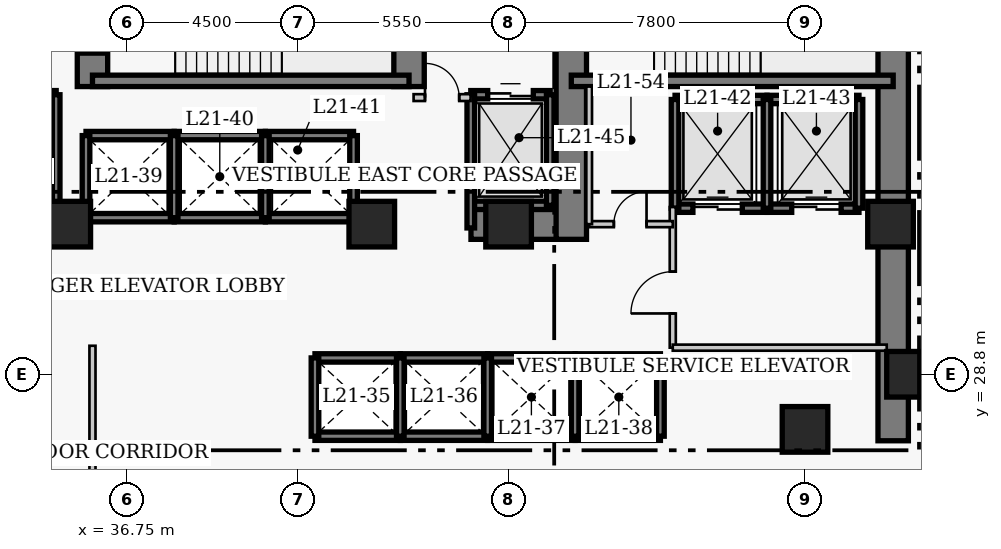
"""IFC4 building model, lengths in metres.
Left out: names, types, materials, properties, quantities, classifications, styles, units other than length and angle.
Written with IfcOpenShell. Run it as: python <this file> out.ifc"""

import sys

from ifc_helpers import new_model, si_unit, direction, frame, frame_2d, origin, origin_2d, place, context, subcontext, project, spatial, rectangle, extrude, element, fill, save


model = new_model("IFC4")
c1 = context("Model", 3, precision=1e-05, world=origin(), true_north=direction((0.0, 1.0)))
c2 = subcontext(c1, "Body", "Model", "MODEL_VIEW")
j1 = project(units=[si_unit("LENGTHUNIT", "METRE"), si_unit("PLANEANGLEUNIT", "RADIAN")], contexts=[c1])
p1 = place(None, origin())
s1 = spatial("IfcSite", under=j1, at=p1, CompositionType="ELEMENT")
p2 = place(p1, origin())
s2 = spatial("IfcBuilding", under=s1, at=p2, CompositionType="ELEMENT")
p3 = place(p2, frame((0.0, 0.0, 88.0)))
s3 = spatial("IfcBuildingStorey", under=s2, at=p3, CompositionType="ELEMENT", Elevation=88.0)
p4 = place(p3, frame((56.92, 27.05, 0.0), z_axis=(0.0, 0.0, 1.0), x_axis=(0.0, 1.0, 0.0)))
e1 = element("IfcWall", 1, at=p4, inside=s3, PredefinedType="SHEAR", context=c2, shape_type="SweptSolid", body=[
    extrude(rectangle(XDim=13.67, YDim=0.8, at=frame_2d((6.835, 0.0))), origin(), (0.0, 0.0, 1.0), 3.8),
])
p5 = place(p3, frame((45.81, 32.75, 0.0), z_axis=(0.0, 0.0, 1.0), x_axis=(1.0, 0.0, 0.0)))
e2 = element("IfcWall", 2, at=p5, inside=s3, PredefinedType="SHEAR", context=c2, shape_type="SweptSolid", body=[
    extrude(rectangle(XDim=2.64, YDim=0.8, at=frame_2d((1.32, 0.0))), origin(), (0.0, 0.0, 1.0), 3.8),
])
p6 = place(p3, frame((35.85, 36.37, 0.0), z_axis=(0.0, 0.0, 1.0), x_axis=(0.0, 1.0, 0.0)))
e3 = element("IfcWall", 3, at=p6, inside=s3, PredefinedType="SHEAR", context=c2, shape_type="SweptSolid", body=[
    extrude(rectangle(XDim=3.95, YDim=0.8, at=frame_2d((1.975, 0.0))), origin(), (0.0, 0.0, 1.0), 3.8),
])
p7 = place(p6, frame((0.88, 0.0, 0.0)))
e4 = element("IfcOpeningElement", 4, at=p7, cuts=e3, PredefinedType="OPENING", context=c2, shape_type="SweptSolid", body=[
    extrude(rectangle(XDim=1.1, YDim=2.15, at=frame_2d((0.55, 1.075))), frame((0.0, 0.41, 0.0), z_axis=(0.0, -1.0, 0.0), x_axis=(1.0, 0.0, 0.0)), (0.0, 0.0, 1.0), 0.82),
])
p8 = place(p3, frame((44.18, 36.37, 0.0), z_axis=(0.0, 0.0, 1.0), x_axis=(0.0, 1.0, 0.0)))
e5 = element("IfcWall", 5, at=p8, inside=s3, PredefinedType="SHEAR", context=c2, shape_type="SweptSolid", body=[
    extrude(rectangle(XDim=3.95, YDim=0.8, at=frame_2d((1.975, 0.0))), origin(), (0.0, 0.0, 1.0), 3.8),
])
p9 = place(p3, frame((48.45, 32.35, 0.0), z_axis=(0.0, 0.0, 1.0), x_axis=(0.0, 1.0, 0.0)))
e6 = element("IfcWall", 6, at=p9, inside=s3, PredefinedType="SHEAR", context=c2, shape_type="SweptSolid", body=[
    extrude(rectangle(XDim=7.97, YDim=0.8, at=frame_2d((3.985, 0.0))), origin(), (0.0, 0.0, 1.0), 3.8),
])
p10 = place(p9, frame((5.85, 0.0, 0.0)))
e7 = element("IfcOpeningElement", 7, at=p10, cuts=e6, PredefinedType="OPENING", context=c2, shape_type="SweptSolid", body=[
    extrude(rectangle(XDim=1.1, YDim=2.15, at=frame_2d((0.55, 1.075))), frame((0.0, 0.41, 0.0), z_axis=(0.0, -1.0, 0.0), x_axis=(1.0, 0.0, 0.0)), (0.0, 0.0, 1.0), 0.82),
])
p11 = place(p3, frame((35.85, 36.52, 0.0), z_axis=(0.0, 0.0, 1.0), x_axis=(1.0, 0.0, 0.0)))
e8 = element("IfcWall", 8, at=p11, inside=s3, PredefinedType="SHEAR", context=c2, shape_type="SweptSolid", body=[
    extrude(rectangle(XDim=8.33, YDim=0.3, at=frame_2d((4.165, 0.0))), origin(), (0.0, 0.0, 1.0), 3.8),
])
p12 = place(p3, frame((48.45, 36.52, 0.0), z_axis=(0.0, 0.0, 1.0), x_axis=(1.0, 0.0, 0.0)))
e9 = element("IfcWall", 9, at=p12, inside=s3, PredefinedType="SHEAR", context=c2, shape_type="SweptSolid", body=[
    extrude(rectangle(XDim=8.47, YDim=0.3, at=frame_2d((4.235, 0.0))), origin(), (0.0, 0.0, 1.0), 3.8),
])
for number, where, z_axis, x_axis in (
    (10, (57.35, 28.8, 0.0), (0.0, 0.0, 1.0), (1.0, 0.0, 0.0)),
    (11, (35.2, 32.75, 0.0), (0.0, 0.0, 1.0), (1.0, 0.0, 0.0)),
    (12, (43.2, 32.75, 0.0), (0.0, 0.0, 1.0), (1.0, 0.0, 0.0)),
    (13, (46.8, 32.75, 0.0), (0.0, 0.0, 1.0), (1.0, 0.0, 0.0)),
    (14, (54.6, 27.35, 0.0), (0.0, 0.0, 1.0), (1.0, 0.0, 0.0)),
    (15, (56.85, 32.75, 0.0), (0.0, 0.0, 1.0), (1.0, 0.0, 0.0)),
):
    element("IfcColumn", number, at=place(p3, frame(where, z_axis=z_axis, x_axis=x_axis)), inside=s3, PredefinedType="COLUMN", context=c2, shape_type="SweptSolid", body=[
        extrude(rectangle(XDim=1.2, YDim=1.2, at=origin_2d()), origin(), (0.0, 0.0, 1.0), 3.8),
    ])
for number, where, z_axis, x_axis in (
    (16, (41.705, 29.23, 0.0), (0.0, 0.0, 1.0), (1.0, 0.0, 0.0)),
    (17, (41.705, 27.17, 0.0), (0.0, 0.0, 1.0), (1.0, 0.0, 0.0)),
):
    element("IfcWall", number, at=place(p3, frame(where, z_axis=z_axis, x_axis=x_axis)), inside=s3, PredefinedType="SHEAR", context=c2, shape_type="SweptSolid", body=[
        extrude(rectangle(XDim=2.245, YDim=0.22, at=frame_2d((1.123, 0.0))), origin(), (0.0, 0.0, 1.0), 3.8),
    ])
p13 = place(p3, frame((41.705, 27.17, 0.0), z_axis=(0.0, 0.0, 1.0), x_axis=(0.0, 1.0, 0.0)))
e18 = element("IfcWall", 18, at=p13, inside=s3, PredefinedType="SHEAR", context=c2, shape_type="SweptSolid", body=[
    extrude(rectangle(XDim=2.06, YDim=0.2, at=frame_2d((1.03, 0.0))), origin(), (0.0, 0.0, 1.0), 3.8),
])
for number, where, z_axis, x_axis in (
    (19, (43.95, 29.23, 0.0), (0.0, 0.0, 1.0), (1.0, 0.0, 0.0)),
    (20, (43.95, 27.17, 0.0), (0.0, 0.0, 1.0), (1.0, 0.0, 0.0)),
):
    element("IfcWall", number, at=place(p3, frame(where, z_axis=z_axis, x_axis=x_axis)), inside=s3, PredefinedType="SHEAR", context=c2, shape_type="SweptSolid", body=[
        extrude(rectangle(XDim=2.3, YDim=0.22, at=frame_2d((1.15, 0.0))), origin(), (0.0, 0.0, 1.0), 3.8),
    ])
p14 = place(p3, frame((43.95, 27.17, 0.0), z_axis=(0.0, 0.0, 1.0), x_axis=(0.0, 1.0, 0.0)))
e21 = element("IfcWall", 21, at=p14, inside=s3, PredefinedType="SHEAR", context=c2, shape_type="SweptSolid", body=[
    extrude(rectangle(XDim=2.06, YDim=0.2, at=frame_2d((1.03, 0.0))), origin(), (0.0, 0.0, 1.0), 3.8),
])
for number, where, z_axis, x_axis in (
    (22, (46.25, 29.23, 0.0), (0.0, 0.0, 1.0), (1.0, 0.0, 0.0)),
    (23, (46.25, 27.17, 0.0), (0.0, 0.0, 1.0), (1.0, 0.0, 0.0)),
):
    element("IfcWall", number, at=place(p3, frame(where, z_axis=z_axis, x_axis=x_axis)), inside=s3, PredefinedType="SHEAR", context=c2, shape_type="SweptSolid", body=[
        extrude(rectangle(XDim=2.3, YDim=0.22, at=frame_2d((1.15, 0.0))), origin(), (0.0, 0.0, 1.0), 3.8),
    ])
p15 = place(p3, frame((46.25, 27.17, 0.0), z_axis=(0.0, 0.0, 1.0), x_axis=(0.0, 1.0, 0.0)))
e24 = element("IfcWall", 24, at=p15, inside=s3, PredefinedType="SHEAR", context=c2, shape_type="SweptSolid", body=[
    extrude(rectangle(XDim=2.06, YDim=0.2, at=frame_2d((1.03, 0.0))), origin(), (0.0, 0.0, 1.0), 3.8),
])
for number, where, z_axis, x_axis in (
    (25, (48.55, 29.23, 0.0), (0.0, 0.0, 1.0), (1.0, 0.0, 0.0)),
    (26, (48.55, 27.17, 0.0), (0.0, 0.0, 1.0), (1.0, 0.0, 0.0)),
):
    element("IfcWall", number, at=place(p3, frame(where, z_axis=z_axis, x_axis=x_axis)), inside=s3, PredefinedType="SHEAR", context=c2, shape_type="SweptSolid", body=[
        extrude(rectangle(XDim=2.245, YDim=0.22, at=frame_2d((1.123, 0.0))), origin(), (0.0, 0.0, 1.0), 3.8),
    ])
for number, where, z_axis, x_axis in (
    (27, (48.55, 27.17, 0.0), (0.0, 0.0, 1.0), (0.0, 1.0, 0.0)),
    (28, (50.795, 27.17, 0.0), (0.0, 0.0, 1.0), (0.0, 1.0, 0.0)),
):
    element("IfcWall", number, at=place(p3, frame(where, z_axis=z_axis, x_axis=x_axis)), inside=s3, PredefinedType="SHEAR", context=c2, shape_type="SweptSolid", body=[
        extrude(rectangle(XDim=2.06, YDim=0.2, at=frame_2d((1.03, 0.0))), origin(), (0.0, 0.0, 1.0), 3.8),
    ])
for number, where, z_axis, x_axis in (
    (29, (35.68, 35.08, 0.0), (0.0, 0.0, 1.0), (1.0, 0.0, 0.0)),
    (30, (35.68, 32.92, 0.0), (0.0, 0.0, 1.0), (1.0, 0.0, 0.0)),
):
    element("IfcWall", number, at=place(p3, frame(where, z_axis=z_axis, x_axis=x_axis)), inside=s3, PredefinedType="SHEAR", context=c2, shape_type="SweptSolid", body=[
        extrude(rectangle(XDim=2.32, YDim=0.22, at=frame_2d((1.16, 0.0))), origin(), (0.0, 0.0, 1.0), 3.8),
    ])
p16 = place(p3, frame((35.68, 32.92, 0.0), z_axis=(0.0, 0.0, 1.0), x_axis=(0.0, 1.0, 0.0)))
e31 = element("IfcWall", 31, at=p16, inside=s3, PredefinedType="SHEAR", context=c2, shape_type="SweptSolid", body=[
    extrude(rectangle(XDim=2.16, YDim=0.2, at=frame_2d((1.08, 0.0))), origin(), (0.0, 0.0, 1.0), 3.8),
])
for number, where, z_axis, x_axis in (
    (32, (38.0, 35.08, 0.0), (0.0, 0.0, 1.0), (1.0, 0.0, 0.0)),
    (33, (38.0, 32.92, 0.0), (0.0, 0.0, 1.0), (1.0, 0.0, 0.0)),
):
    element("IfcWall", number, at=place(p3, frame(where, z_axis=z_axis, x_axis=x_axis)), inside=s3, PredefinedType="SHEAR", context=c2, shape_type="SweptSolid", body=[
        extrude(rectangle(XDim=2.4, YDim=0.22, at=frame_2d((1.2, 0.0))), origin(), (0.0, 0.0, 1.0), 3.8),
    ])
p17 = place(p3, frame((38.0, 32.92, 0.0), z_axis=(0.0, 0.0, 1.0), x_axis=(0.0, 1.0, 0.0)))
e34 = element("IfcWall", 34, at=p17, inside=s3, PredefinedType="SHEAR", context=c2, shape_type="SweptSolid", body=[
    extrude(rectangle(XDim=2.16, YDim=0.2, at=frame_2d((1.08, 0.0))), origin(), (0.0, 0.0, 1.0), 3.8),
])
for number, where, z_axis, x_axis in (
    (35, (40.4, 35.08, 0.0), (0.0, 0.0, 1.0), (1.0, 0.0, 0.0)),
    (36, (40.4, 32.92, 0.0), (0.0, 0.0, 1.0), (1.0, 0.0, 0.0)),
):
    element("IfcWall", number, at=place(p3, frame(where, z_axis=z_axis, x_axis=x_axis)), inside=s3, PredefinedType="SHEAR", context=c2, shape_type="SweptSolid", body=[
        extrude(rectangle(XDim=2.32, YDim=0.22, at=frame_2d((1.16, 0.0))), origin(), (0.0, 0.0, 1.0), 3.8),
    ])
for number, where, z_axis, x_axis in (
    (37, (40.4, 32.92, 0.0), (0.0, 0.0, 1.0), (0.0, 1.0, 0.0)),
    (38, (42.72, 32.92, 0.0), (0.0, 0.0, 1.0), (0.0, 1.0, 0.0)),
):
    element("IfcWall", number, at=place(p3, frame(where, z_axis=z_axis, x_axis=x_axis)), inside=s3, PredefinedType="SHEAR", context=c2, shape_type="SweptSolid", body=[
        extrude(rectangle(XDim=2.16, YDim=0.2, at=frame_2d((1.08, 0.0))), origin(), (0.0, 0.0, 1.0), 3.8),
    ])
p18 = place(p3, frame((51.18, 36.03, 0.0), z_axis=(0.0, 0.0, 1.0), x_axis=(1.0, 0.0, 0.0)))
e39 = element("IfcWall", 39, at=p18, inside=s3, PredefinedType="SHEAR", context=c2, shape_type="SweptSolid", body=[
    extrude(rectangle(XDim=2.42, YDim=0.22, at=frame_2d((1.21, 0.0))), origin(), (0.0, 0.0, 1.0), 3.8),
])
p19 = place(p3, frame((51.18, 33.17, 0.0), z_axis=(0.0, 0.0, 1.0), x_axis=(1.0, 0.0, 0.0)))
e40 = element("IfcWall", 40, at=p19, inside=s3, PredefinedType="SHEAR", context=c2, shape_type="SweptSolid", body=[
    extrude(rectangle(XDim=2.42, YDim=0.22, at=frame_2d((1.21, 0.0))), origin(), (0.0, 0.0, 1.0), 3.8),
])
p20 = place(p19, frame((0.47, 0.0, 0.0)))
e41 = element("IfcOpeningElement", 41, at=p20, cuts=e40, PredefinedType="OPENING", context=c2, shape_type="SweptSolid", body=[
    extrude(rectangle(XDim=1.3, YDim=2.15, at=frame_2d((0.65, 1.075))), frame((0.0, 0.12, 0.0), z_axis=(0.0, -1.0, 0.0), x_axis=(1.0, 0.0, 0.0)), (0.0, 0.0, 1.0), 0.24),
])
p21 = place(p3, frame((51.18, 33.17, 0.0), z_axis=(0.0, 0.0, 1.0), x_axis=(0.0, 1.0, 0.0)))
e42 = element("IfcWall", 42, at=p21, inside=s3, PredefinedType="SHEAR", context=c2, shape_type="SweptSolid", body=[
    extrude(rectangle(XDim=2.86, YDim=0.2, at=frame_2d((1.43, 0.0))), origin(), (0.0, 0.0, 1.0), 3.8),
])
p22 = place(p3, frame((53.6, 36.03, 0.0), z_axis=(0.0, 0.0, 1.0), x_axis=(1.0, 0.0, 0.0)))
e43 = element("IfcWall", 43, at=p22, inside=s3, PredefinedType="SHEAR", context=c2, shape_type="SweptSolid", body=[
    extrude(rectangle(XDim=2.42, YDim=0.22, at=frame_2d((1.21, 0.0))), origin(), (0.0, 0.0, 1.0), 3.8),
])
p23 = place(p3, frame((53.6, 33.17, 0.0), z_axis=(0.0, 0.0, 1.0), x_axis=(1.0, 0.0, 0.0)))
e44 = element("IfcWall", 44, at=p23, inside=s3, PredefinedType="SHEAR", context=c2, shape_type="SweptSolid", body=[
    extrude(rectangle(XDim=2.42, YDim=0.22, at=frame_2d((1.21, 0.0))), origin(), (0.0, 0.0, 1.0), 3.8),
])
p24 = place(p23, frame((0.65, 0.0, 0.0)))
e45 = element("IfcOpeningElement", 45, at=p24, cuts=e44, PredefinedType="OPENING", context=c2, shape_type="SweptSolid", body=[
    extrude(rectangle(XDim=1.3, YDim=2.15, at=frame_2d((0.65, 1.075))), frame((0.0, 0.12, 0.0), z_axis=(0.0, -1.0, 0.0), x_axis=(1.0, 0.0, 0.0)), (0.0, 0.0, 1.0), 0.24),
])
for number, where, z_axis, x_axis in (
    (46, (53.6, 33.17, 0.0), (0.0, 0.0, 1.0), (0.0, 1.0, 0.0)),
    (47, (56.02, 33.17, 0.0), (0.0, 0.0, 1.0), (0.0, 1.0, 0.0)),
):
    element("IfcWall", number, at=place(p3, frame(where, z_axis=z_axis, x_axis=x_axis)), inside=s3, PredefinedType="SHEAR", context=c2, shape_type="SweptSolid", body=[
        extrude(rectangle(XDim=2.86, YDim=0.2, at=frame_2d((1.43, 0.0))), origin(), (0.0, 0.0, 1.0), 3.8),
    ])
p25 = place(p3, frame((32.805, 36.155, 0.0), z_axis=(0.0, 0.0, 1.0), x_axis=(1.0, 0.0, 0.0)))
e48 = element("IfcWall", 48, at=p25, inside=s3, PredefinedType="SHEAR", context=c2, shape_type="SweptSolid", body=[
    extrude(rectangle(XDim=2.09, YDim=0.22, at=frame_2d((1.045, 0.0))), origin(), (0.0, 0.0, 1.0), 3.8),
])
p26 = place(p25, frame((0.445, 0.0, 0.0)))
e49 = element("IfcOpeningElement", 49, at=p26, cuts=e48, PredefinedType="OPENING", context=c2, shape_type="SweptSolid", body=[
    extrude(rectangle(XDim=1.2, YDim=2.15, at=frame_2d((0.6, 1.075))), frame((0.0, 0.12, 0.0), z_axis=(0.0, -1.0, 0.0), x_axis=(1.0, 0.0, 0.0)), (0.0, 0.0, 1.0), 0.24),
])
p27 = place(p3, frame((32.805, 33.245, 0.0), z_axis=(0.0, 0.0, 1.0), x_axis=(1.0, 0.0, 0.0)))
e50 = element("IfcWall", 50, at=p27, inside=s3, PredefinedType="SHEAR", context=c2, shape_type="SweptSolid", body=[
    extrude(rectangle(XDim=2.09, YDim=0.22, at=frame_2d((1.045, 0.0))), origin(), (0.0, 0.0, 1.0), 3.8),
])
p28 = place(p3, frame((34.895, 33.245, 0.0), z_axis=(0.0, 0.0, 1.0), x_axis=(0.0, 1.0, 0.0)))
e51 = element("IfcWall", 51, at=p28, inside=s3, PredefinedType="SHEAR", context=c2, shape_type="SweptSolid", body=[
    extrude(rectangle(XDim=2.91, YDim=0.2, at=frame_2d((1.455, 0.0))), origin(), (0.0, 0.0, 1.0), 3.8),
])
p29 = place(p3, frame((45.805, 36.155, 0.0), z_axis=(0.0, 0.0, 1.0), x_axis=(1.0, 0.0, 0.0)))
e52 = element("IfcWall", 52, at=p29, inside=s3, PredefinedType="SHEAR", context=c2, shape_type="SweptSolid", body=[
    extrude(rectangle(XDim=2.09, YDim=0.22, at=frame_2d((1.045, 0.0))), origin(), (0.0, 0.0, 1.0), 3.8),
])
p30 = place(p29, frame((0.445, 0.0, 0.0)))
e53 = element("IfcOpeningElement", 53, at=p30, cuts=e52, PredefinedType="OPENING", context=c2, shape_type="SweptSolid", body=[
    extrude(rectangle(XDim=1.2, YDim=2.15, at=frame_2d((0.6, 1.075))), frame((0.0, 0.12, 0.0), z_axis=(0.0, -1.0, 0.0), x_axis=(1.0, 0.0, 0.0)), (0.0, 0.0, 1.0), 0.24),
])
p31 = place(p3, frame((45.805, 33.245, 0.0), z_axis=(0.0, 0.0, 1.0), x_axis=(1.0, 0.0, 0.0)))
e54 = element("IfcWall", 54, at=p31, inside=s3, PredefinedType="SHEAR", context=c2, shape_type="SweptSolid", body=[
    extrude(rectangle(XDim=2.09, YDim=0.22, at=frame_2d((1.045, 0.0))), origin(), (0.0, 0.0, 1.0), 3.8),
])
p32 = place(p3, frame((45.805, 32.65, 0.0), z_axis=(0.0, 0.0, 1.0), x_axis=(0.0, 1.0, 0.0)))
e55 = element("IfcWall", 55, at=p32, inside=s3, PredefinedType="SHEAR", context=c2, shape_type="SweptSolid", body=[
    extrude(rectangle(XDim=3.505, YDim=0.2, at=frame_2d((1.752, 0.0))), origin(), (0.0, 0.0, 1.0), 3.8),
])
p33 = place(p3, frame((47.895, 33.245, 0.0), z_axis=(0.0, 0.0, 1.0), x_axis=(0.0, 1.0, 0.0)))
e56 = element("IfcWall", 56, at=p33, inside=s3, PredefinedType="SHEAR", context=c2, shape_type="SweptSolid", body=[
    extrude(rectangle(XDim=2.91, YDim=0.2, at=frame_2d((1.455, 0.0))), origin(), (0.0, 0.0, 1.0), 3.8),
])
p34 = place(p3, frame((44.3, 36.08, 0.0), z_axis=(0.0, 0.0, 1.0), x_axis=(1.0, 0.0, 0.0)))
e57 = element("IfcWall", 57, at=p34, inside=s3, PredefinedType="PARTITIONING", context=c2, shape_type="SweptSolid", body=[
    extrude(rectangle(XDim=1.5, YDim=0.18, at=frame_2d((0.75, 0.0))), origin(), (0.0, 0.0, 1.0), 3.54),
])
p35 = place(p34, frame((0.3, 0.0, 0.0)))
e58 = element("IfcOpeningElement", 58, at=p35, cuts=e57, PredefinedType="OPENING", context=c2, shape_type="SweptSolid", body=[
    extrude(rectangle(XDim=0.9, YDim=2.15, at=frame_2d((0.45, 1.075))), frame((0.0, 0.1, 0.0), z_axis=(0.0, -1.0, 0.0), x_axis=(1.0, 0.0, 0.0)), (0.0, 0.0, 1.0), 0.2),
])
p36 = place(p3, frame((51.12, 29.5, 0.0), z_axis=(0.0, 0.0, 1.0), x_axis=(0.0, 1.0, 0.0)))
e59 = element("IfcWall", 59, at=p36, inside=s3, PredefinedType="PARTITIONING", context=c2, shape_type="SweptSolid", body=[
    extrude(rectangle(XDim=3.7, YDim=0.16, at=frame_2d((1.85, 0.0))), origin(), (0.0, 0.0, 1.0), 3.54),
])
p37 = place(p36, frame((0.9, 0.0, 0.0)))
e60 = element("IfcOpeningElement", 60, at=p37, cuts=e59, PredefinedType="OPENING", context=c2, shape_type="SweptSolid", body=[
    extrude(rectangle(XDim=1.1, YDim=2.15, at=frame_2d((0.55, 1.075))), frame((0.0, 0.09, 0.0), z_axis=(0.0, -1.0, 0.0), x_axis=(1.0, 0.0, 0.0)), (0.0, 0.0, 1.0), 0.18),
])
p38 = place(p3, frame((51.12, 29.5, 0.0), z_axis=(0.0, 0.0, 1.0), x_axis=(1.0, 0.0, 0.0)))
e61 = element("IfcWall", 61, at=p38, inside=s3, PredefinedType="PARTITIONING", context=c2, shape_type="SweptSolid", body=[
    extrude(rectangle(XDim=5.63, YDim=0.16, at=frame_2d((2.815, 0.0))), origin(), (0.0, 0.0, 1.0), 3.54),
])
p39 = place(p3, frame((48.92, 32.75, 0.0), z_axis=(0.0, 0.0, 1.0), x_axis=(1.0, 0.0, 0.0)))
e62 = element("IfcWall", 62, at=p39, inside=s3, PredefinedType="PARTITIONING", context=c2, shape_type="SweptSolid", body=[
    extrude(rectangle(XDim=2.2, YDim=0.16, at=frame_2d((1.1, 0.0))), origin(), (0.0, 0.0, 1.0), 3.54),
])
p40 = place(p39, frame((0.65, 0.0, 0.0)))
e63 = element("IfcOpeningElement", 63, at=p40, cuts=e62, PredefinedType="OPENING", context=c2, shape_type="SweptSolid", body=[
    extrude(rectangle(XDim=0.86, YDim=2.05, at=frame_2d((0.43, 1.025))), frame((0.0, 0.09, 0.0), z_axis=(0.0, -1.0, 0.0), x_axis=(1.0, 0.0, 0.0)), (0.0, 0.0, 1.0), 0.18),
])
p41 = place(p3, frame((48.92, 32.75, 0.0), z_axis=(0.0, 0.0, 1.0), x_axis=(0.0, 1.0, 0.0)))
e64 = element("IfcWall", 64, at=p41, inside=s3, PredefinedType="PARTITIONING", context=c2, shape_type="SweptSolid", body=[
    extrude(rectangle(XDim=3.62, YDim=0.15, at=frame_2d((1.81, 0.0))), origin(), (0.0, 0.0, 1.0), 3.54),
])
p42 = place(p3, frame((35.85, 26.11, 0.0), z_axis=(0.0, 0.0, 1.0), x_axis=(0.0, 1.0, 0.0)))
e65 = element("IfcWall", 65, at=p42, inside=s3, PredefinedType="PARTITIONING", context=c2, shape_type="SweptSolid", body=[
    extrude(rectangle(XDim=3.44, YDim=0.16, at=frame_2d((1.72, 0.0))), origin(), (0.0, 0.0, 1.0), 3.54),
])
p43 = place(p20, origin())
e66 = element("IfcDoor", 66, at=p43, inside=s3, OperationType="DOUBLE_DOOR_SLIDING", PredefinedType="DOOR", context=c2, shape_type="SweptSolid", body=[
    extrude(rectangle(XDim=1.3, YDim=2.15, at=frame_2d((0.65, 1.075))), frame((0.0, 0.025, 0.0), z_axis=(0.0, -1.0, 0.0), x_axis=(1.0, 0.0, 0.0)), (0.0, 0.0, 1.0), 0.05),
])
fill(e41, e66)
p44 = place(p24, origin())
e67 = element("IfcDoor", 67, at=p44, inside=s3, OperationType="DOUBLE_DOOR_SLIDING", PredefinedType="DOOR", context=c2, shape_type="SweptSolid", body=[
    extrude(rectangle(XDim=1.3, YDim=2.15, at=frame_2d((0.65, 1.075))), frame((0.0, 0.025, 0.0), z_axis=(0.0, -1.0, 0.0), x_axis=(1.0, 0.0, 0.0)), (0.0, 0.0, 1.0), 0.05),
])
fill(e45, e67)
p45 = place(p30, origin())
e68 = element("IfcDoor", 68, at=p45, inside=s3, OperationType="DOUBLE_DOOR_SLIDING", PredefinedType="DOOR", context=c2, shape_type="SweptSolid", body=[
    extrude(rectangle(XDim=1.2, YDim=2.15, at=frame_2d((0.6, 1.075))), frame((0.0, 0.025, 0.0), z_axis=(0.0, -1.0, 0.0), x_axis=(1.0, 0.0, 0.0)), (0.0, 0.0, 1.0), 0.05),
])
fill(e53, e68)
p46 = place(p35, origin())
e69 = element("IfcDoor", 69, at=p46, inside=s3, OperationType="SINGLE_SWING_LEFT", PredefinedType="DOOR", context=c2, shape_type="SweptSolid", body=[
    extrude(rectangle(XDim=0.9, YDim=2.15, at=frame_2d((0.45, 1.075))), frame((0.0, 0.025, 0.0), z_axis=(0.0, -1.0, 0.0), x_axis=(1.0, 0.0, 0.0)), (0.0, 0.0, 1.0), 0.05),
])
fill(e58, e69)
p47 = place(p37, origin())
e70 = element("IfcDoor", 70, at=p47, inside=s3, OperationType="SINGLE_SWING_LEFT", PredefinedType="DOOR", context=c2, shape_type="SweptSolid", body=[
    extrude(rectangle(XDim=1.1, YDim=2.15, at=frame_2d((0.55, 1.075))), frame((0.0, 0.025, 0.0), z_axis=(0.0, -1.0, 0.0), x_axis=(1.0, 0.0, 0.0)), (0.0, 0.0, 1.0), 0.05),
])
fill(e60, e70)
p48 = place(p40, origin())
e71 = element("IfcDoor", 71, at=p48, inside=s3, OperationType="SINGLE_SWING_RIGHT", PredefinedType="DOOR", context=c2, shape_type="SweptSolid", body=[
    extrude(rectangle(XDim=0.86, YDim=2.05, at=frame_2d((0.43, 1.025))), frame((0.0, 0.025, 0.0), z_axis=(0.0, -1.0, 0.0), x_axis=(1.0, 0.0, 0.0)), (0.0, 0.0, 1.0), 0.05),
])
fill(e63, e71)
p49 = place(p7, origin())
e72 = element("IfcDoor", 72, at=p49, inside=s3, OperationType="SINGLE_SWING_RIGHT", PredefinedType="DOOR", context=c2, shape_type="SweptSolid", body=[
    extrude(rectangle(XDim=1.1, YDim=2.15, at=frame_2d((0.55, 1.075))), frame((0.0, 0.025, 0.0), z_axis=(0.0, -1.0, 0.0), x_axis=(1.0, 0.0, 0.0)), (0.0, 0.0, 1.0), 0.05),
])
fill(e4, e72)
save(model, sys.argv[1])
